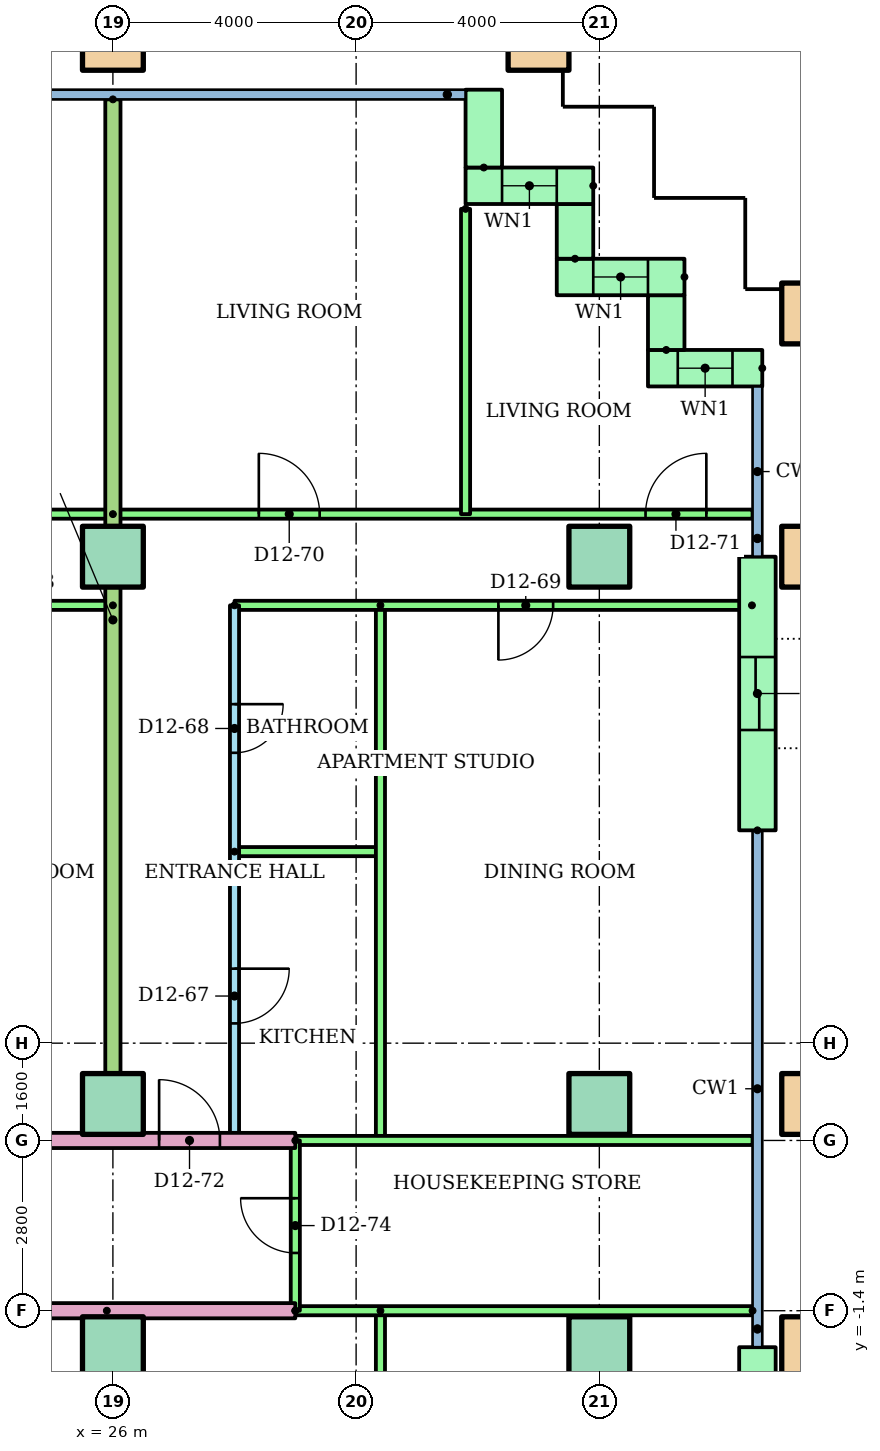
"""IFC4 building model, lengths in metres.
Left out: names, types, materials, properties, quantities, classifications, styles, units other than length and angle.
Written with IfcOpenShell. Run it as: python <this file> out.ifc"""

import sys

from ifc_helpers import new_model, si_unit, direction, frame, frame_2d, origin, origin_2d, place, context, subcontext, project, spatial, rectangle, hollow_rectangle, extrude, element, fill, save


model = new_model("IFC4")
c1 = context("Model", 3, precision=1e-05, world=origin(), true_north=direction((0.0, 1.0)))
c2 = subcontext(c1, "Body", "Model", "MODEL_VIEW")
j1 = project(units=[si_unit("LENGTHUNIT", "METRE"), si_unit("PLANEANGLEUNIT", "RADIAN")], contexts=[c1])
p1 = place(None, origin())
s1 = spatial("IfcSite", under=j1, at=p1, CompositionType="ELEMENT")
p2 = place(p1, origin())
s2 = spatial("IfcBuilding", under=s1, at=p2, CompositionType="ELEMENT")
p3 = place(p2, frame((0.0, 0.0, 48.0)))
s3 = spatial("IfcBuildingStorey", under=s2, at=p3, CompositionType="ELEMENT", Elevation=48.0)
for number, where in (
    (1, (26.0, -2.0, 0.0)),
    (2, (34.0, -2.0, 0.0)),
):
    element("IfcColumn", number, at=place(p3, frame(where)), inside=s3, PredefinedType="COLUMN", context=c2, shape_type="SweptSolid", body=[
        extrude(rectangle(XDim=1.0, YDim=1.0, at=origin_2d()), origin(), (0.0, 0.0, 1.0), 3.2),
    ])
p4 = place(p3, frame((37.5, -2.0, 0.0)))
e3 = element("IfcColumn", 3, at=p4, inside=s3, PredefinedType="COLUMN", context=c2, shape_type="SweptSolid", body=[
    extrude(hollow_rectangle(XDim=1.0, YDim=1.0, WallThickness=0.05, at=origin_2d()), origin(), (0.0, 0.0, 1.0), 3.2),
])
for number, where in (
    (4, (26.0, 2.0, 0.0)),
    (5, (34.0, 2.0, 0.0)),
):
    element("IfcColumn", number, at=place(p3, frame(where)), inside=s3, PredefinedType="COLUMN", context=c2, shape_type="SweptSolid", body=[
        extrude(rectangle(XDim=1.0, YDim=1.0, at=origin_2d()), origin(), (0.0, 0.0, 1.0), 3.2),
    ])
p5 = place(p3, frame((37.5, 2.0, 0.0)))
e6 = element("IfcColumn", 6, at=p5, inside=s3, PredefinedType="COLUMN", context=c2, shape_type="SweptSolid", body=[
    extrude(hollow_rectangle(XDim=1.0, YDim=1.0, WallThickness=0.05, at=origin_2d()), origin(), (0.0, 0.0, 1.0), 3.2),
])
for number, where in (
    (7, (26.0, 11.0, 0.0)),
    (8, (34.0, 11.0, 0.0)),
):
    element("IfcColumn", number, at=place(p3, frame(where)), inside=s3, PredefinedType="COLUMN", context=c2, shape_type="SweptSolid", body=[
        extrude(rectangle(XDim=1.0, YDim=1.0, at=origin_2d()), origin(), (0.0, 0.0, 1.0), 3.2),
    ])
for number, where in (
    (9, (37.5, 11.0, 0.0)),
    (10, (37.5, 15.0, 0.0)),
    (11, (26.0, 19.5, 0.0)),
    (12, (33.0, 19.5, 0.0)),
):
    element("IfcColumn", number, at=place(p3, frame(where)), inside=s3, PredefinedType="COLUMN", context=c2, shape_type="SweptSolid", body=[
        extrude(hollow_rectangle(XDim=1.0, YDim=1.0, WallThickness=0.05, at=origin_2d()), origin(), (0.0, 0.0, 1.0), 3.2),
    ])
p6 = place(p3, frame((36.68, 14.1, 0.0), z_axis=(0.0, 0.0, 1.0), x_axis=(-1.0, 0.0, 0.0)))
e13 = element("IfcWall", 13, at=p6, inside=s3, PredefinedType="STANDARD", context=c2, shape_type="SweptSolid", body=[
    extrude(rectangle(XDim=1.88, YDim=0.6, at=frame_2d((0.94, 0.0))), origin(), (0.0, 0.0, 1.0), 2.92),
])
p7 = place(p6, frame((0.49, 0.0, 0.9)))
e14 = element("IfcOpeningElement", 14, at=p7, cuts=e13, PredefinedType="OPENING", context=c2, shape_type="SweptSolid", body=[
    extrude(rectangle(XDim=0.9, YDim=1.5, at=frame_2d((0.45, 0.75))), frame((0.0, 0.31, 0.0), z_axis=(0.0, -1.0, 0.0), x_axis=(1.0, 0.0, 0.0)), (0.0, 0.0, 1.0), 0.62),
])
p8 = place(p3, frame((35.1, 14.4, 0.0), z_axis=(0.0, 0.0, 1.0), x_axis=(0.0, 1.0, 0.0)))
e15 = element("IfcWall", 15, at=p8, inside=s3, PredefinedType="STANDARD", context=c2, shape_type="SweptSolid", body=[
    extrude(rectangle(XDim=0.9, YDim=0.6, at=frame_2d((0.45, 0.0))), origin(), (0.0, 0.0, 1.0), 2.92),
])
p9 = place(p3, frame((35.4, 15.6, 0.0), z_axis=(0.0, 0.0, 1.0), x_axis=(-1.0, 0.0, 0.0)))
e16 = element("IfcWall", 16, at=p9, inside=s3, PredefinedType="STANDARD", context=c2, shape_type="SweptSolid", body=[
    extrude(rectangle(XDim=2.1, YDim=0.6, at=frame_2d((1.05, 0.0))), origin(), (0.0, 0.0, 1.0), 2.92),
])
p10 = place(p9, frame((0.6, 0.0, 0.9)))
e17 = element("IfcOpeningElement", 17, at=p10, cuts=e16, PredefinedType="OPENING", context=c2, shape_type="SweptSolid", body=[
    extrude(rectangle(XDim=0.9, YDim=1.5, at=frame_2d((0.45, 0.75))), frame((0.0, 0.31, 0.0), z_axis=(0.0, -1.0, 0.0), x_axis=(1.0, 0.0, 0.0)), (0.0, 0.0, 1.0), 0.62),
])
p11 = place(p3, frame((33.6, 15.9, 0.0), z_axis=(0.0, 0.0, 1.0), x_axis=(0.0, 1.0, 0.0)))
e18 = element("IfcWall", 18, at=p11, inside=s3, PredefinedType="STANDARD", context=c2, shape_type="SweptSolid", body=[
    extrude(rectangle(XDim=0.9, YDim=0.6, at=frame_2d((0.45, 0.0))), origin(), (0.0, 0.0, 1.0), 2.92),
])
p12 = place(p3, frame((33.9, 17.1, 0.0), z_axis=(0.0, 0.0, 1.0), x_axis=(-1.0, 0.0, 0.0)))
e19 = element("IfcWall", 19, at=p12, inside=s3, PredefinedType="STANDARD", context=c2, shape_type="SweptSolid", body=[
    extrude(rectangle(XDim=2.1, YDim=0.6, at=frame_2d((1.05, 0.0))), origin(), (0.0, 0.0, 1.0), 2.92),
])
p13 = place(p12, frame((0.6, 0.0, 0.9)))
e20 = element("IfcOpeningElement", 20, at=p13, cuts=e19, PredefinedType="OPENING", context=c2, shape_type="SweptSolid", body=[
    extrude(rectangle(XDim=0.9, YDim=1.5, at=frame_2d((0.45, 0.75))), frame((0.0, 0.31, 0.0), z_axis=(0.0, -1.0, 0.0), x_axis=(1.0, 0.0, 0.0)), (0.0, 0.0, 1.0), 0.62),
])
p14 = place(p3, frame((32.1, 17.4, 0.0), z_axis=(0.0, 0.0, 1.0), x_axis=(0.0, 1.0, 0.0)))
e21 = element("IfcWall", 21, at=p14, inside=s3, PredefinedType="STANDARD", context=c2, shape_type="SweptSolid", body=[
    extrude(rectangle(XDim=1.28, YDim=0.6, at=frame_2d((0.64, 0.0))), origin(), (0.0, 0.0, 1.0), 2.92),
])
p15 = place(p3, frame((36.6, -5.7, 0.0), z_axis=(0.0, 0.0, 1.0), x_axis=(0.0, 1.0, 0.0)))
e22 = element("IfcWall", 22, at=p15, inside=s3, PredefinedType="STANDARD", context=c2, shape_type="SweptSolid", body=[
    extrude(rectangle(XDim=3.7, YDim=0.6, at=frame_2d((1.85, 0.0))), origin(), (0.0, 0.0, 1.0), 2.92),
])
p16 = place(p15, frame((1.25, 0.0, 0.0)))
e23 = element("IfcOpeningElement", 23, at=p16, cuts=e22, PredefinedType="OPENING", context=c2, shape_type="SweptSolid", body=[
    extrude(rectangle(XDim=1.2, YDim=2.1, at=frame_2d((0.6, 1.05))), frame((0.0, 0.31, 0.0), z_axis=(0.0, -1.0, 0.0), x_axis=(1.0, 0.0, 0.0)), (0.0, 0.0, 1.0), 0.62),
])
p17 = place(p3, frame((36.6, 6.5, 0.0), z_axis=(0.0, 0.0, 1.0), x_axis=(0.0, 1.0, 0.0)))
e24 = element("IfcWall", 24, at=p17, inside=s3, PredefinedType="STANDARD", context=c2, shape_type="SweptSolid", body=[
    extrude(rectangle(XDim=4.5, YDim=0.6, at=frame_2d((2.25, 0.0))), origin(), (0.0, 0.0, 1.0), 2.92),
])
p18 = place(p17, frame((1.65, 0.0, 0.0)))
e25 = element("IfcOpeningElement", 25, at=p18, cuts=e24, PredefinedType="OPENING", context=c2, shape_type="SweptSolid", body=[
    extrude(rectangle(XDim=1.2, YDim=2.1, at=frame_2d((0.6, 1.05))), frame((0.0, 0.31, 0.0), z_axis=(0.0, -1.0, 0.0), x_axis=(1.0, 0.0, 0.0)), (0.0, 0.0, 1.0), 0.62),
])
for number, where, z_axis, x_axis in (
    (26, (25.9, -1.4, 0.0), (0.0, 0.0, 1.0), (0.0, -1.0, 0.0)),
    (27, (30.4, -1.4, 0.0), (0.0, 0.0, 1.0), (0.0, -1.0, 0.0)),
):
    element("IfcWall", number, at=place(p3, frame(where, z_axis=z_axis, x_axis=x_axis)), inside=s3, PredefinedType="PARTITIONING", context=c2, shape_type="SweptSolid", body=[
        extrude(rectangle(XDim=6.4, YDim=0.15, at=frame_2d((3.2, 0.0))), origin(), (0.0, 0.0, 1.0), 2.4),
    ])
p19 = place(p3, frame((29.0, -1.4, 0.0), z_axis=(0.0, 0.0, 1.0), x_axis=(-1.0, 0.0, 0.0)))
e28 = element("IfcWall", 28, at=p19, inside=s3, PredefinedType="PARTITIONING", context=c2, shape_type="SweptSolid", body=[
    extrude(rectangle(XDim=15.0, YDim=0.25, at=frame_2d((7.5, 0.0))), origin(), (0.0, 0.0, 1.0), 2.4),
])
p20 = place(p19, frame((9.24, 0.0, 0.0)))
e29 = element("IfcOpeningElement", 29, at=p20, cuts=e28, PredefinedType="OPENING", context=c2, shape_type="SweptSolid", body=[
    extrude(rectangle(XDim=1.0, YDim=2.1, at=frame_2d((0.5, 1.05))), frame((0.0, 0.135, 0.0), z_axis=(0.0, -1.0, 0.0), x_axis=(1.0, 0.0, 0.0)), (0.0, 0.0, 1.0), 0.27),
])
p21 = place(p3, frame((36.52, -1.4, 0.0), z_axis=(0.0, 0.0, 1.0), x_axis=(-1.0, 0.0, 0.0)))
e30 = element("IfcWall", 30, at=p21, inside=s3, PredefinedType="PARTITIONING", context=c2, shape_type="SweptSolid", body=[
    extrude(rectangle(XDim=7.52, YDim=0.15, at=frame_2d((3.76, 0.0))), origin(), (0.0, 0.0, 1.0), 2.4),
])
p22 = place(p3, frame((26.0, 10.2, 0.0), z_axis=(0.0, 0.0, 1.0), x_axis=(-1.0, 0.0, 0.0)))
e31 = element("IfcWall", 31, at=p22, inside=s3, PredefinedType="PARTITIONING", context=c2, shape_type="SweptSolid", body=[
    extrude(rectangle(XDim=10.0, YDim=0.15, at=frame_2d((5.0, 0.0))), origin(), (0.0, 0.0, 1.0), 2.4),
])
p23 = place(p22, frame((4.9, 0.0, 0.0)))
e32 = element("IfcOpeningElement", 32, at=p23, cuts=e31, PredefinedType="OPENING", context=c2, shape_type="SweptSolid", body=[
    extrude(rectangle(XDim=0.9, YDim=2.1, at=frame_2d((0.45, 1.05))), frame((0.0, 0.085, 0.0), z_axis=(0.0, -1.0, 0.0), x_axis=(1.0, 0.0, 0.0)), (0.0, 0.0, 1.0), 0.17),
])
p24 = place(p22, frame((1.1, 0.0, 0.0)))
e33 = element("IfcOpeningElement", 33, at=p24, cuts=e31, PredefinedType="OPENING", context=c2, shape_type="SweptSolid", body=[
    extrude(rectangle(XDim=0.9, YDim=2.1, at=frame_2d((0.45, 1.05))), frame((0.0, 0.085, 0.0), z_axis=(0.0, -1.0, 0.0), x_axis=(1.0, 0.0, 0.0)), (0.0, 0.0, 1.0), 0.17),
])
p25 = place(p3, frame((14.0, 11.7, 0.0)))
e34 = element("IfcWall", 34, at=p25, inside=s3, PredefinedType="PARTITIONING", context=c2, shape_type="SweptSolid", body=[
    extrude(rectangle(XDim=12.0, YDim=0.15, at=frame_2d((6.0, 0.0))), origin(), (0.0, 0.0, 1.0), 2.4),
])
p26 = place(p25, frame((1.5, 0.0, 0.0)))
e35 = element("IfcOpeningElement", 35, at=p26, cuts=e34, PredefinedType="OPENING", context=c2, shape_type="SweptSolid", body=[
    extrude(rectangle(XDim=1.0, YDim=2.1, at=frame_2d((0.5, 1.05))), frame((0.0, 0.085, 0.0), z_axis=(0.0, -1.0, 0.0), x_axis=(1.0, 0.0, 0.0)), (0.0, 0.0, 1.0), 0.17),
])
p27 = place(p25, frame((7.55, 0.0, 0.0)))
e36 = element("IfcOpeningElement", 36, at=p27, cuts=e34, PredefinedType="OPENING", context=c2, shape_type="SweptSolid", body=[
    extrude(rectangle(XDim=0.9, YDim=2.1, at=frame_2d((0.45, 1.05))), frame((0.0, 0.085, 0.0), z_axis=(0.0, -1.0, 0.0), x_axis=(1.0, 0.0, 0.0)), (0.0, 0.0, 1.0), 0.17),
])
p28 = place(p3, frame((28.0, 10.2, 0.0), z_axis=(0.0, 0.0, 1.0), x_axis=(0.0, -1.0, 0.0)))
e37 = element("IfcWall", 37, at=p28, inside=s3, PredefinedType="PARTITIONING", context=c2, shape_type="SweptSolid", body=[
    extrude(rectangle(XDim=8.8, YDim=0.15, at=frame_2d((4.4, 0.0))), origin(), (0.0, 0.0, 1.0), 2.4),
])
p29 = place(p28, frame((5.975, 0.0, 0.0)))
e38 = element("IfcOpeningElement", 38, at=p29, cuts=e37, PredefinedType="OPENING", context=c2, shape_type="SweptSolid", body=[
    extrude(rectangle(XDim=0.9, YDim=2.1, at=frame_2d((0.45, 1.05))), frame((0.0, 0.085, 0.0), z_axis=(0.0, -1.0, 0.0), x_axis=(1.0, 0.0, 0.0)), (0.0, 0.0, 1.0), 0.17),
])
p30 = place(p28, frame((1.625, 0.0, 0.0)))
e39 = element("IfcOpeningElement", 39, at=p30, cuts=e37, PredefinedType="OPENING", context=c2, shape_type="SweptSolid", body=[
    extrude(rectangle(XDim=0.8, YDim=2.1, at=frame_2d((0.4, 1.05))), frame((0.0, 0.085, 0.0), z_axis=(0.0, -1.0, 0.0), x_axis=(1.0, 0.0, 0.0)), (0.0, 0.0, 1.0), 0.17),
])
p31 = place(p3, frame((28.0, 6.15, 0.0)))
e40 = element("IfcWall", 40, at=p31, inside=s3, PredefinedType="PARTITIONING", context=c2, shape_type="SweptSolid", body=[
    extrude(rectangle(XDim=2.4, YDim=0.15, at=frame_2d((1.2, 0.0))), origin(), (0.0, 0.0, 1.0), 2.4),
])
p32 = place(p3, frame((30.4, 10.2, 0.0), z_axis=(0.0, 0.0, 1.0), x_axis=(0.0, -1.0, 0.0)))
e41 = element("IfcWall", 41, at=p32, inside=s3, PredefinedType="PARTITIONING", context=c2, shape_type="SweptSolid", body=[
    extrude(rectangle(XDim=8.8, YDim=0.15, at=frame_2d((4.4, 0.0))), origin(), (0.0, 0.0, 1.0), 2.4),
])
p33 = place(p3, frame((36.51, 10.2, 0.0), z_axis=(0.0, 0.0, 1.0), x_axis=(-1.0, 0.0, 0.0)))
e42 = element("IfcWall", 42, at=p33, inside=s3, PredefinedType="PARTITIONING", context=c2, shape_type="SweptSolid", body=[
    extrude(rectangle(XDim=8.51, YDim=0.15, at=frame_2d((4.255, 0.0))), origin(), (0.0, 0.0, 1.0), 2.4),
])
p34 = place(p33, frame((3.27, 0.0, 0.0)))
e43 = element("IfcOpeningElement", 43, at=p34, cuts=e42, PredefinedType="OPENING", context=c2, shape_type="SweptSolid", body=[
    extrude(rectangle(XDim=0.9, YDim=2.1, at=frame_2d((0.45, 1.05))), frame((0.0, 0.085, 0.0), z_axis=(0.0, -1.0, 0.0), x_axis=(1.0, 0.0, 0.0)), (0.0, 0.0, 1.0), 0.17),
])
p35 = place(p3, frame((26.0, 11.7, 0.0)))
e44 = element("IfcWall", 44, at=p35, inside=s3, PredefinedType="PARTITIONING", context=c2, shape_type="SweptSolid", body=[
    extrude(rectangle(XDim=10.52, YDim=0.15, at=frame_2d((5.26, 0.0))), origin(), (0.0, 0.0, 1.0), 2.4),
])
p36 = place(p35, frame((2.4, 0.0, 0.0)))
e45 = element("IfcOpeningElement", 45, at=p36, cuts=e44, PredefinedType="OPENING", context=c2, shape_type="SweptSolid", body=[
    extrude(rectangle(XDim=1.0, YDim=2.1, at=frame_2d((0.5, 1.05))), frame((0.0, 0.085, 0.0), z_axis=(0.0, -1.0, 0.0), x_axis=(1.0, 0.0, 0.0)), (0.0, 0.0, 1.0), 0.17),
])
p37 = place(p35, frame((8.76, 0.0, 0.0)))
e46 = element("IfcOpeningElement", 46, at=p37, cuts=e44, PredefinedType="OPENING", context=c2, shape_type="SweptSolid", body=[
    extrude(rectangle(XDim=1.0, YDim=2.1, at=frame_2d((0.5, 1.05))), frame((0.0, 0.085, 0.0), z_axis=(0.0, -1.0, 0.0), x_axis=(1.0, 0.0, 0.0)), (0.0, 0.0, 1.0), 0.17),
])
p38 = place(p3, frame((31.8, 16.72, 0.0), z_axis=(0.0, 0.0, 1.0), x_axis=(0.0, -1.0, 0.0)))
e47 = element("IfcWall", 47, at=p38, inside=s3, PredefinedType="PARTITIONING", context=c2, shape_type="SweptSolid", body=[
    extrude(rectangle(XDim=5.02, YDim=0.15, at=frame_2d((2.51, 0.0))), origin(), (0.0, 0.0, 1.0), 2.4),
])
p39 = place(p3, frame((26.0, 18.521, 0.0), z_axis=(0.0, 0.0, 1.0), x_axis=(0.0, -1.0, 0.0)))
e48 = element("IfcWall", 48, at=p39, inside=s3, PredefinedType="PARTITIONING", context=c2, shape_type="SweptSolid", body=[
    extrude(rectangle(XDim=17.121, YDim=0.25, at=frame_2d((8.561, 0.0))), origin(), (0.0, 0.0, 1.0), 2.4),
])
p40 = place(p3, frame((14.0, 1.4, 0.0)))
e49 = element("IfcWall", 49, at=p40, inside=s3, PredefinedType="PARTITIONING", context=c2, shape_type="SweptSolid", body=[
    extrude(rectangle(XDim=15.0, YDim=0.25, at=frame_2d((7.5, 0.0))), origin(), (0.0, 0.0, 1.0), 2.4),
])
p41 = place(p40, frame((0.5, 0.0, 0.0)))
e50 = element("IfcOpeningElement", 50, at=p41, cuts=e49, PredefinedType="OPENING", context=c2, shape_type="SweptSolid", body=[
    extrude(rectangle(XDim=1.0, YDim=2.1, at=frame_2d((0.5, 1.05))), frame((0.0, 0.135, 0.0), z_axis=(0.0, -1.0, 0.0), x_axis=(1.0, 0.0, 0.0)), (0.0, 0.0, 1.0), 0.27),
])
p42 = place(p40, frame((12.76, 0.0, 0.0)))
e51 = element("IfcOpeningElement", 51, at=p42, cuts=e49, PredefinedType="OPENING", context=c2, shape_type="SweptSolid", body=[
    extrude(rectangle(XDim=1.0, YDim=2.1, at=frame_2d((0.5, 1.05))), frame((0.0, 0.135, 0.0), z_axis=(0.0, -1.0, 0.0), x_axis=(1.0, 0.0, 0.0)), (0.0, 0.0, 1.0), 0.27),
])
p43 = place(p3, frame((29.0, 1.4, 0.0)))
e52 = element("IfcWall", 52, at=p43, inside=s3, PredefinedType="PARTITIONING", context=c2, shape_type="SweptSolid", body=[
    extrude(rectangle(XDim=7.52, YDim=0.15, at=frame_2d((3.76, 0.0))), origin(), (0.0, 0.0, 1.0), 2.4),
])
p44 = place(p3, frame((29.0, -1.4, 0.0), z_axis=(0.0, 0.0, 1.0), x_axis=(0.0, 1.0, 0.0)))
e53 = element("IfcWall", 53, at=p44, inside=s3, PredefinedType="PARTITIONING", context=c2, shape_type="SweptSolid", body=[
    extrude(rectangle(XDim=2.8, YDim=0.15, at=frame_2d((1.4, 0.0))), origin(), (0.0, 0.0, 1.0), 2.4),
])
p45 = place(p44, frame((0.95, 0.0, 0.0)))
e54 = element("IfcOpeningElement", 54, at=p45, cuts=e53, PredefinedType="OPENING", context=c2, shape_type="SweptSolid", body=[
    extrude(rectangle(XDim=0.9, YDim=2.1, at=frame_2d((0.45, 1.05))), frame((0.0, 0.085, 0.0), z_axis=(0.0, -1.0, 0.0), x_axis=(1.0, 0.0, 0.0)), (0.0, 0.0, 1.0), 0.17),
])
p46 = place(p7, origin())
e55 = element("IfcWindow", 55, at=p46, inside=s3, PartitioningType="SINGLE_PANEL", PredefinedType="WINDOW", context=c2, shape_type="SweptSolid", body=[
    extrude(rectangle(XDim=0.9, YDim=1.5, at=frame_2d((0.45, 0.75))), frame((0.0, 0.03, 0.0), z_axis=(0.0, -1.0, 0.0), x_axis=(1.0, 0.0, 0.0)), (0.0, 0.0, 1.0), 0.06),
])
fill(e14, e55)
p47 = place(p10, origin())
e56 = element("IfcWindow", 56, at=p47, inside=s3, PartitioningType="SINGLE_PANEL", PredefinedType="WINDOW", context=c2, shape_type="SweptSolid", body=[
    extrude(rectangle(XDim=0.9, YDim=1.5, at=frame_2d((0.45, 0.75))), frame((0.0, 0.03, 0.0), z_axis=(0.0, -1.0, 0.0), x_axis=(1.0, 0.0, 0.0)), (0.0, 0.0, 1.0), 0.06),
])
fill(e17, e56)
p48 = place(p13, origin())
e57 = element("IfcWindow", 57, at=p48, inside=s3, PartitioningType="SINGLE_PANEL", PredefinedType="WINDOW", context=c2, shape_type="SweptSolid", body=[
    extrude(rectangle(XDim=0.9, YDim=1.5, at=frame_2d((0.45, 0.75))), frame((0.0, 0.03, 0.0), z_axis=(0.0, -1.0, 0.0), x_axis=(1.0, 0.0, 0.0)), (0.0, 0.0, 1.0), 0.06),
])
fill(e20, e57)
p49 = place(p29, origin())
e58 = element("IfcDoor", 58, at=p49, inside=s3, OperationType="SINGLE_SWING_LEFT", PredefinedType="DOOR", context=c2, shape_type="SweptSolid", body=[
    extrude(rectangle(XDim=0.9, YDim=2.1, at=frame_2d((0.45, 1.05))), frame((0.0, 0.025, 0.0), z_axis=(0.0, -1.0, 0.0), x_axis=(1.0, 0.0, 0.0)), (0.0, 0.0, 1.0), 0.05),
])
fill(e38, e58)
p50 = place(p30, origin())
e59 = element("IfcDoor", 59, at=p50, inside=s3, OperationType="SINGLE_SWING_LEFT", PredefinedType="DOOR", context=c2, shape_type="SweptSolid", body=[
    extrude(rectangle(XDim=0.8, YDim=2.1, at=frame_2d((0.4, 1.05))), frame((0.0, 0.025, 0.0), z_axis=(0.0, -1.0, 0.0), x_axis=(1.0, 0.0, 0.0)), (0.0, 0.0, 1.0), 0.05),
])
fill(e39, e59)
p51 = place(p34, origin())
e60 = element("IfcDoor", 60, at=p51, inside=s3, OperationType="SINGLE_SWING_RIGHT", PredefinedType="DOOR", context=c2, shape_type="SweptSolid", body=[
    extrude(rectangle(XDim=0.9, YDim=2.1, at=frame_2d((0.45, 1.05))), frame((0.0, 0.025, 0.0), z_axis=(0.0, -1.0, 0.0), x_axis=(1.0, 0.0, 0.0)), (0.0, 0.0, 1.0), 0.05),
])
fill(e43, e60)
p52 = place(p36, origin())
e61 = element("IfcDoor", 61, at=p52, inside=s3, OperationType="SINGLE_SWING_LEFT", PredefinedType="DOOR", context=c2, shape_type="SweptSolid", body=[
    extrude(rectangle(XDim=1.0, YDim=2.1, at=frame_2d((0.5, 1.05))), frame((0.0, 0.025, 0.0), z_axis=(0.0, -1.0, 0.0), x_axis=(1.0, 0.0, 0.0)), (0.0, 0.0, 1.0), 0.05),
])
fill(e45, e61)
p53 = place(p37, origin())
e62 = element("IfcDoor", 62, at=p53, inside=s3, OperationType="SINGLE_SWING_RIGHT", PredefinedType="DOOR", context=c2, shape_type="SweptSolid", body=[
    extrude(rectangle(XDim=1.0, YDim=2.1, at=frame_2d((0.5, 1.05))), frame((0.0, 0.025, 0.0), z_axis=(0.0, -1.0, 0.0), x_axis=(1.0, 0.0, 0.0)), (0.0, 0.0, 1.0), 0.05),
])
fill(e46, e62)
p54 = place(p42, origin())
e63 = element("IfcDoor", 63, at=p54, inside=s3, OperationType="SINGLE_SWING_LEFT", PredefinedType="DOOR", context=c2, shape_type="SweptSolid", body=[
    extrude(rectangle(XDim=1.0, YDim=2.1, at=frame_2d((0.5, 1.05))), frame((0.0, 0.025, 0.0), z_axis=(0.0, -1.0, 0.0), x_axis=(1.0, 0.0, 0.0)), (0.0, 0.0, 1.0), 0.05),
])
fill(e51, e63)
p55 = place(p45, origin())
e64 = element("IfcDoor", 64, at=p55, inside=s3, OperationType="SINGLE_SWING_RIGHT", PredefinedType="DOOR", context=c2, shape_type="SweptSolid", body=[
    extrude(rectangle(XDim=0.9, YDim=2.1, at=frame_2d((0.45, 1.05))), frame((0.0, 0.025, 0.0), z_axis=(0.0, -1.0, 0.0), x_axis=(1.0, 0.0, 0.0)), (0.0, 0.0, 1.0), 0.05),
])
fill(e54, e64)
p56 = place(p18, origin())
e65 = element("IfcDoor", 65, at=p56, inside=s3, OperationType="SLIDING_TO_LEFT", PredefinedType="DOOR", context=c2, shape_type="SweptSolid", body=[
    extrude(rectangle(XDim=1.2, YDim=2.1, at=frame_2d((0.6, 1.05))), frame((0.0, 0.025, 0.0), z_axis=(0.0, -1.0, 0.0), x_axis=(1.0, 0.0, 0.0)), (0.0, 0.0, 1.0), 0.05),
])
fill(e25, e65)
save(model, sys.argv[1])
